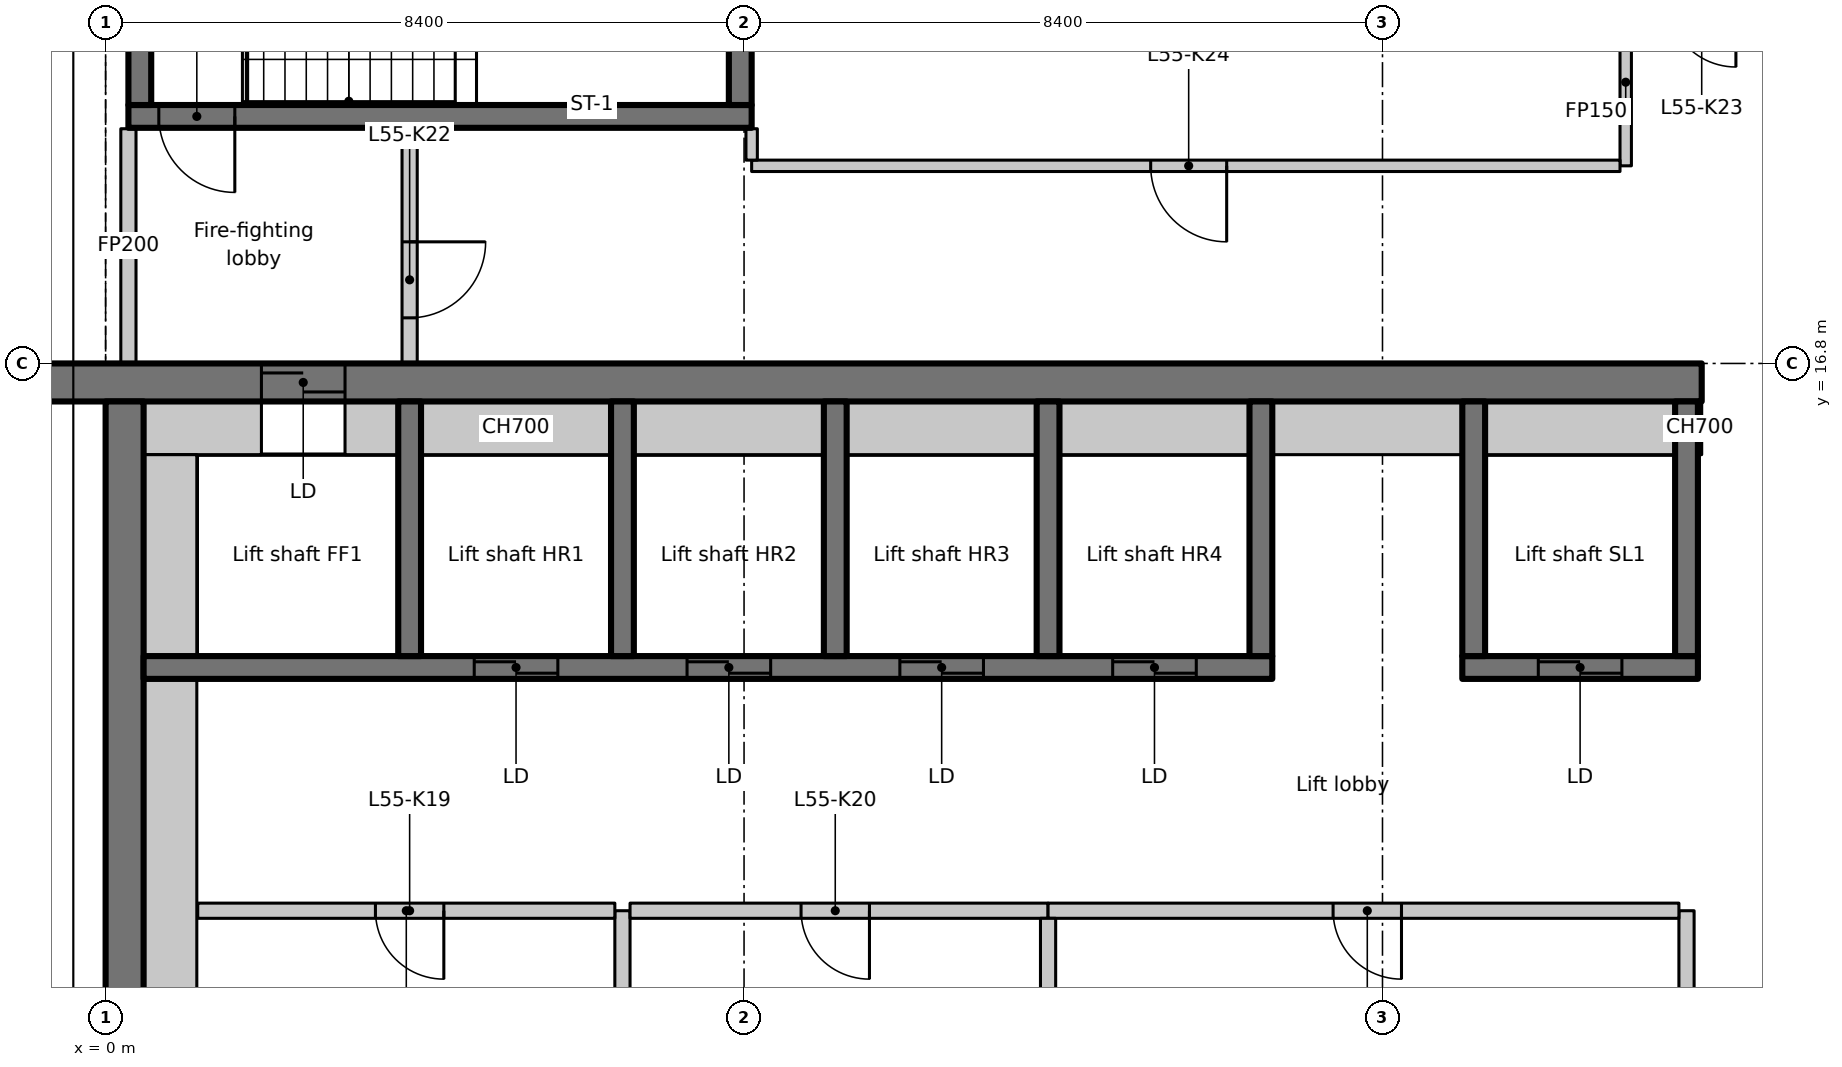
"""IFC4 building model, lengths in metres.
Left out: names, types, materials, properties, quantities, classifications, styles, units other than length and angle.
Written with IfcOpenShell. Run it as: python <this file> out.ifc"""

import sys

from ifc_helpers import new_model, si_unit, direction, frame, frame_2d, origin, place, context, subcontext, project, spatial, rectangle, extrude, element, fill, save


model = new_model("IFC4")
c1 = context("Model", 3, precision=1e-05, world=origin(), true_north=direction((0.0, 1.0)))
c2 = subcontext(c1, "Body", "Model", "MODEL_VIEW")
j1 = project(units=[si_unit("LENGTHUNIT", "METRE"), si_unit("PLANEANGLEUNIT", "RADIAN")], contexts=[c1])
p1 = place(None, origin())
s1 = spatial("IfcSite", under=j1, at=p1, CompositionType="ELEMENT")
p2 = place(p1, origin())
s2 = spatial("IfcBuilding", under=s1, at=p2, CompositionType="ELEMENT")
p3 = place(p2, frame((0.0, 0.0, 219.3)))
s3 = spatial("IfcBuildingStorey", under=s2, at=p3, CompositionType="ELEMENT", Elevation=219.3)
p4 = place(p3, frame((-1.1, 16.55, 0.0), z_axis=(0.0, 0.0, 1.0), x_axis=(1.0, 0.0, 0.0)))
e1 = element("IfcWall", 1, at=p4, inside=s3, PredefinedType="SHEAR", context=c2, shape_type="SweptSolid", body=[
    extrude(rectangle(XDim=22.1, YDim=0.5, at=frame_2d((11.05, 0.0))), origin(), (0.0, 0.0, 1.0), 3.35),
])
p5 = place(p4, frame((3.15, 0.0, 0.0)))
e2 = element("IfcOpeningElement", 2, at=p5, cuts=e1, PredefinedType="OPENING", context=c2, shape_type="SweptSolid", body=[
    extrude(rectangle(XDim=1.1, YDim=2.3, at=frame_2d((0.55, 1.15))), frame((0.0, 0.26, 0.0), z_axis=(0.0, -1.0, 0.0), x_axis=(1.0, 0.0, 0.0)), (0.0, 0.0, 1.0), 0.52),
])
p6 = place(p3, frame((0.25, 7.436, 0.0), z_axis=(0.0, 0.0, 1.0), x_axis=(0.0, 1.0, 0.0)))
e3 = element("IfcWall", 3, at=p6, inside=s3, PredefinedType="SHEAR", context=c2, shape_type="SweptSolid", body=[
    extrude(rectangle(XDim=8.864, YDim=0.5, at=frame_2d((4.432, 0.0))), origin(), (0.0, 0.0, 1.0), 3.35),
])
p7 = place(p3, frame((0.5, 15.95, 0.0), z_axis=(0.0, 0.0, 1.0), x_axis=(1.0, 0.0, 0.0)))
e4 = element("IfcWall", 4, at=p7, inside=s3, PredefinedType="PARTITIONING", context=c2, shape_type="SweptSolid", body=[
    extrude(rectangle(XDim=1.55, YDim=0.7, at=frame_2d((0.775, 0.0))), origin(), (0.0, 0.0, 1.0), 3.35),
])
p8 = place(p3, frame((0.5, 12.8, 0.0), z_axis=(0.0, 0.0, 1.0), x_axis=(1.0, 0.0, 0.0)))
e5 = element("IfcWall", 5, at=p8, inside=s3, PredefinedType="SHEAR", context=c2, shape_type="SweptSolid", body=[
    extrude(rectangle(XDim=14.85, YDim=0.3, at=frame_2d((7.425, 0.0))), origin(), (0.0, 0.0, 1.0), 3.35),
])
p9 = place(p8, frame((4.35, 0.0, 0.0)))
e6 = element("IfcOpeningElement", 6, at=p9, cuts=e5, PredefinedType="OPENING", context=c2, shape_type="SweptSolid", body=[
    extrude(rectangle(XDim=1.1, YDim=2.3, at=frame_2d((0.55, 1.15))), frame((0.0, 0.16, 0.0), z_axis=(0.0, -1.0, 0.0), x_axis=(1.0, 0.0, 0.0)), (0.0, 0.0, 1.0), 0.32),
])
p10 = place(p8, frame((7.15, 0.0, 0.0)))
e7 = element("IfcOpeningElement", 7, at=p10, cuts=e5, PredefinedType="OPENING", context=c2, shape_type="SweptSolid", body=[
    extrude(rectangle(XDim=1.1, YDim=2.3, at=frame_2d((0.55, 1.15))), frame((0.0, 0.16, 0.0), z_axis=(0.0, -1.0, 0.0), x_axis=(1.0, 0.0, 0.0)), (0.0, 0.0, 1.0), 0.32),
])
p11 = place(p8, frame((9.95, 0.0, 0.0)))
e8 = element("IfcOpeningElement", 8, at=p11, cuts=e5, PredefinedType="OPENING", context=c2, shape_type="SweptSolid", body=[
    extrude(rectangle(XDim=1.1, YDim=2.3, at=frame_2d((0.55, 1.15))), frame((0.0, 0.16, 0.0), z_axis=(0.0, -1.0, 0.0), x_axis=(1.0, 0.0, 0.0)), (0.0, 0.0, 1.0), 0.32),
])
p12 = place(p8, frame((12.75, 0.0, 0.0)))
e9 = element("IfcOpeningElement", 9, at=p12, cuts=e5, PredefinedType="OPENING", context=c2, shape_type="SweptSolid", body=[
    extrude(rectangle(XDim=1.1, YDim=2.3, at=frame_2d((0.55, 1.15))), frame((0.0, 0.16, 0.0), z_axis=(0.0, -1.0, 0.0), x_axis=(1.0, 0.0, 0.0)), (0.0, 0.0, 1.0), 0.32),
])
for number, where, z_axis, x_axis in (
    (10, (4.0, 12.95, 0.0), (0.0, 0.0, 1.0), (0.0, 1.0, 0.0)),
    (11, (6.8, 12.95, 0.0), (0.0, 0.0, 1.0), (0.0, 1.0, 0.0)),
    (12, (9.6, 12.95, 0.0), (0.0, 0.0, 1.0), (0.0, 1.0, 0.0)),
    (13, (12.4, 12.95, 0.0), (0.0, 0.0, 1.0), (0.0, 1.0, 0.0)),
    (14, (15.2, 12.95, 0.0), (0.0, 0.0, 1.0), (0.0, 1.0, 0.0)),
):
    element("IfcWall", number, at=place(p3, frame(where, z_axis=z_axis, x_axis=x_axis)), inside=s3, PredefinedType="SHEAR", context=c2, shape_type="SweptSolid", body=[
        extrude(rectangle(XDim=3.35, YDim=0.3, at=frame_2d((1.675, 0.0))), origin(), (0.0, 0.0, 1.0), 3.35),
    ])
p13 = place(p3, frame((17.85, 12.8, 0.0), z_axis=(0.0, 0.0, 1.0), x_axis=(1.0, 0.0, 0.0)))
e15 = element("IfcWall", 15, at=p13, inside=s3, PredefinedType="SHEAR", context=c2, shape_type="SweptSolid", body=[
    extrude(rectangle(XDim=3.1, YDim=0.3, at=frame_2d((1.55, 0.0))), origin(), (0.0, 0.0, 1.0), 3.35),
])
p14 = place(p13, frame((1.0, 0.0, 0.0)))
e16 = element("IfcOpeningElement", 16, at=p14, cuts=e15, PredefinedType="OPENING", context=c2, shape_type="SweptSolid", body=[
    extrude(rectangle(XDim=1.1, YDim=2.3, at=frame_2d((0.55, 1.15))), frame((0.0, 0.16, 0.0), z_axis=(0.0, -1.0, 0.0), x_axis=(1.0, 0.0, 0.0)), (0.0, 0.0, 1.0), 0.32),
])
for number, where, z_axis, x_axis in (
    (17, (18.0, 12.95, 0.0), (0.0, 0.0, 1.0), (0.0, 1.0, 0.0)),
    (18, (20.8, 12.95, 0.0), (0.0, 0.0, 1.0), (0.0, 1.0, 0.0)),
):
    element("IfcWall", number, at=place(p3, frame(where, z_axis=z_axis, x_axis=x_axis)), inside=s3, PredefinedType="SHEAR", context=c2, shape_type="SweptSolid", body=[
        extrude(rectangle(XDim=3.35, YDim=0.3, at=frame_2d((1.675, 0.0))), origin(), (0.0, 0.0, 1.0), 3.35),
    ])
p15 = place(p3, frame((8.5, 20.05, 0.0), z_axis=(0.0, 0.0, 1.0), x_axis=(-1.0, 0.0, 0.0)))
e19 = element("IfcWall", 19, at=p15, inside=s3, PredefinedType="SHEAR", context=c2, shape_type="SweptSolid", body=[
    extrude(rectangle(XDim=8.2, YDim=0.3, at=frame_2d((4.1, 0.0))), origin(), (0.0, 0.0, 1.0), 3.35),
])
p16 = place(p15, frame((6.8, 0.0, 0.0)))
e20 = element("IfcOpeningElement", 20, at=p16, cuts=e19, PredefinedType="OPENING", context=c2, shape_type="SweptSolid", body=[
    extrude(rectangle(XDim=1.0, YDim=2.1, at=frame_2d((0.5, 1.05))), frame((0.0, 0.16, 0.0), z_axis=(0.0, -1.0, 0.0), x_axis=(1.0, 0.0, 0.0)), (0.0, 0.0, 1.0), 0.32),
])
for number, where, z_axis, x_axis in (
    (21, (0.45, 20.2, 0.0), (0.0, 0.0, 1.0), (0.0, 1.0, 0.0)),
    (22, (8.35, 20.2, 0.0), (0.0, 0.0, 1.0), (0.0, 1.0, 0.0)),
):
    element("IfcWall", number, at=place(p3, frame(where, z_axis=z_axis, x_axis=x_axis)), inside=s3, PredefinedType="SHEAR", context=c2, shape_type="SweptSolid", body=[
        extrude(rectangle(XDim=2.55, YDim=0.3, at=frame_2d((1.275, 0.0))), origin(), (0.0, 0.0, 1.0), 3.35),
    ])
p17 = place(p3, frame((0.3, 16.812, 0.0), z_axis=(0.0, 0.0, 1.0), x_axis=(0.0, 1.0, 0.0)))
e23 = element("IfcWall", 23, at=p17, inside=s3, PredefinedType="PARTITIONING", context=c2, shape_type="SweptSolid", body=[
    extrude(rectangle(XDim=3.076, YDim=0.2, at=frame_2d((1.538, 0.0))), origin(), (0.0, 0.0, 1.0), 2.98),
])
p18 = place(p3, frame((4.0, 19.888, 0.0), z_axis=(0.0, 0.0, 1.0), x_axis=(0.0, -1.0, 0.0)))
e24 = element("IfcWall", 24, at=p18, inside=s3, PredefinedType="PARTITIONING", context=c2, shape_type="SweptSolid", body=[
    extrude(rectangle(XDim=3.076, YDim=0.2, at=frame_2d((1.538, 0.0))), origin(), (0.0, 0.0, 1.0), 3.35),
])
p19 = place(p18, frame((1.488, 0.0, 0.0)))
e25 = element("IfcOpeningElement", 25, at=p19, cuts=e24, PredefinedType="OPENING", context=c2, shape_type="SweptSolid", body=[
    extrude(rectangle(XDim=1.0, YDim=2.1, at=frame_2d((0.5, 1.05))), frame((0.0, 0.11, 0.0), z_axis=(0.0, -1.0, 0.0), x_axis=(1.0, 0.0, 0.0)), (0.0, 0.0, 1.0), 0.22),
])
p20 = place(p3, frame((6.8, 9.6, 0.0), z_axis=(0.0, 0.0, 1.0), x_axis=(0.0, -1.0, 0.0)))
e26 = element("IfcWall", 26, at=p20, inside=s3, PredefinedType="PARTITIONING", context=c2, shape_type="SweptSolid", body=[
    extrude(rectangle(XDim=2.5, YDim=0.2, at=frame_2d((1.25, 0.0))), origin(), (0.0, 0.0, 1.0), 3.35),
])
p21 = place(p3, frame((6.7, 9.6, 0.0), z_axis=(0.0, 0.0, 1.0), x_axis=(-1.0, 0.0, 0.0)))
e27 = element("IfcWall", 27, at=p21, inside=s3, PredefinedType="PARTITIONING", context=c2, shape_type="SweptSolid", body=[
    extrude(rectangle(XDim=5.488, YDim=0.2, at=frame_2d((2.744, 0.0))), origin(), (0.0, 0.0, 1.0), 3.35),
])
p22 = place(p21, frame((2.25, 0.0, 0.0)))
e28 = element("IfcOpeningElement", 28, at=p22, cuts=e27, PredefinedType="OPENING", context=c2, shape_type="SweptSolid", body=[
    extrude(rectangle(XDim=0.9, YDim=2.1, at=frame_2d((0.45, 1.05))), frame((0.0, 0.11, 0.0), z_axis=(0.0, -1.0, 0.0), x_axis=(1.0, 0.0, 0.0)), (0.0, 0.0, 1.0), 0.22),
])
p23 = place(p3, frame((12.4, 9.6, 0.0), z_axis=(0.0, 0.0, 1.0), x_axis=(-1.0, 0.0, 0.0)))
e29 = element("IfcWall", 29, at=p23, inside=s3, PredefinedType="PARTITIONING", context=c2, shape_type="SweptSolid", body=[
    extrude(rectangle(XDim=5.5, YDim=0.2, at=frame_2d((2.75, 0.0))), origin(), (0.0, 0.0, 1.0), 3.35),
])
p24 = place(p23, frame((2.35, 0.0, 0.0)))
e30 = element("IfcOpeningElement", 30, at=p24, cuts=e29, PredefinedType="OPENING", context=c2, shape_type="SweptSolid", body=[
    extrude(rectangle(XDim=0.9, YDim=2.1, at=frame_2d((0.45, 1.05))), frame((0.0, 0.11, 0.0), z_axis=(0.0, -1.0, 0.0), x_axis=(1.0, 0.0, 0.0)), (0.0, 0.0, 1.0), 0.22),
])
p25 = place(p3, frame((20.8, 7.1, 0.0), z_axis=(0.0, 0.0, 1.0), x_axis=(0.0, 1.0, 0.0)))
e31 = element("IfcWall", 31, at=p25, inside=s3, PredefinedType="PARTITIONING", context=c2, shape_type="SweptSolid", body=[
    extrude(rectangle(XDim=2.5, YDim=0.2, at=frame_2d((1.25, 0.0))), origin(), (0.0, 0.0, 1.0), 3.35),
])
p26 = place(p3, frame((20.7, 9.6, 0.0), z_axis=(0.0, 0.0, 1.0), x_axis=(-1.0, 0.0, 0.0)))
e32 = element("IfcWall", 32, at=p26, inside=s3, PredefinedType="PARTITIONING", context=c2, shape_type="SweptSolid", body=[
    extrude(rectangle(XDim=8.3, YDim=0.2, at=frame_2d((4.15, 0.0))), origin(), (0.0, 0.0, 1.0), 3.35),
])
p27 = place(p26, frame((3.65, 0.0, 0.0)))
e33 = element("IfcOpeningElement", 33, at=p27, cuts=e32, PredefinedType="OPENING", context=c2, shape_type="SweptSolid", body=[
    extrude(rectangle(XDim=0.9, YDim=2.1, at=frame_2d((0.45, 1.05))), frame((0.0, 0.11, 0.0), z_axis=(0.0, -1.0, 0.0), x_axis=(1.0, 0.0, 0.0)), (0.0, 0.0, 1.0), 0.22),
])
p28 = place(p3, frame((12.4, 9.5, 0.0), z_axis=(0.0, 0.0, 1.0), x_axis=(0.0, -1.0, 0.0)))
e34 = element("IfcWall", 34, at=p28, inside=s3, PredefinedType="PARTITIONING", context=c2, shape_type="SweptSolid", body=[
    extrude(rectangle(XDim=2.4, YDim=0.2, at=frame_2d((1.2, 0.0))), origin(), (0.0, 0.0, 1.0), 3.35),
])
p29 = place(p3, frame((20.0, 21.6, 0.0), z_axis=(0.0, 0.0, 1.0), x_axis=(0.0, -1.0, 0.0)))
e35 = element("IfcWall", 35, at=p29, inside=s3, PredefinedType="PARTITIONING", context=c2, shape_type="SweptSolid", body=[
    extrude(rectangle(XDim=2.2, YDim=0.15, at=frame_2d((1.1, 0.0))), origin(), (0.0, 0.0, 1.0), 3.35),
])
p30 = place(p3, frame((19.925, 19.4, 0.0), z_axis=(0.0, 0.0, 1.0), x_axis=(-1.0, 0.0, 0.0)))
e36 = element("IfcWall", 36, at=p30, inside=s3, PredefinedType="PARTITIONING", context=c2, shape_type="SweptSolid", body=[
    extrude(rectangle(XDim=11.425, YDim=0.15, at=frame_2d((5.712, 0.0))), origin(), (0.0, 0.0, 1.0), 3.35),
])
p31 = place(p30, frame((5.175, 0.0, 0.0)))
e37 = element("IfcOpeningElement", 37, at=p31, cuts=e36, PredefinedType="OPENING", context=c2, shape_type="SweptSolid", body=[
    extrude(rectangle(XDim=1.0, YDim=2.1, at=frame_2d((0.5, 1.05))), frame((0.0, 0.085, 0.0), z_axis=(0.0, -1.0, 0.0), x_axis=(1.0, 0.0, 0.0)), (0.0, 0.0, 1.0), 0.17),
])
p32 = place(p3, frame((8.5, 19.475, 0.0), z_axis=(0.0, 0.0, 1.0), x_axis=(0.0, 1.0, 0.0)))
e38 = element("IfcWall", 38, at=p32, inside=s3, PredefinedType="PARTITIONING", context=c2, shape_type="SweptSolid", body=[
    extrude(rectangle(XDim=0.413, YDim=0.15, at=frame_2d((0.207, 0.0))), origin(), (0.0, 0.0, 1.0), 3.35),
])
p33 = place(p3, frame((0.85, 7.436, 0.0), z_axis=(0.0, 0.0, 1.0), x_axis=(0.0, 1.0, 0.0)))
e39 = element("IfcWall", 39, at=p33, inside=s3, PredefinedType="PARTITIONING", context=c2, shape_type="SweptSolid", body=[
    extrude(rectangle(XDim=5.214, YDim=0.7, at=frame_2d((2.607, 0.0))), origin(), (0.0, 0.0, 1.0), 3.35),
])
p34 = place(p3, frame((0.85, 12.95, 0.0), z_axis=(0.0, 0.0, 1.0), x_axis=(0.0, 1.0, 0.0)))
e40 = element("IfcWall", 40, at=p34, inside=s3, PredefinedType="PARTITIONING", context=c2, shape_type="SweptSolid", body=[
    extrude(rectangle(XDim=2.65, YDim=0.7, at=frame_2d((1.325, 0.0))), origin(), (0.0, 0.0, 1.0), 3.35),
])
p35 = place(p3, frame((3.15, 15.95, 0.0), z_axis=(0.0, 0.0, 1.0), x_axis=(1.0, 0.0, 0.0)))
e41 = element("IfcWall", 41, at=p35, inside=s3, PredefinedType="PARTITIONING", context=c2, shape_type="SweptSolid", body=[
    extrude(rectangle(XDim=0.7, YDim=0.7, at=frame_2d((0.35, 0.0))), origin(), (0.0, 0.0, 1.0), 3.35),
])
for number, where, z_axis, x_axis in (
    (42, (4.15, 15.95, 0.0), (0.0, 0.0, 1.0), (1.0, 0.0, 0.0)),
    (43, (6.95, 15.95, 0.0), (0.0, 0.0, 1.0), (1.0, 0.0, 0.0)),
    (44, (9.75, 15.95, 0.0), (0.0, 0.0, 1.0), (1.0, 0.0, 0.0)),
    (45, (12.55, 15.95, 0.0), (0.0, 0.0, 1.0), (1.0, 0.0, 0.0)),
    (46, (15.35, 15.95, 0.0), (0.0, 0.0, 1.0), (1.0, 0.0, 0.0)),
    (47, (18.15, 15.95, 0.0), (0.0, 0.0, 1.0), (1.0, 0.0, 0.0)),
):
    element("IfcWall", number, at=place(p3, frame(where, z_axis=z_axis, x_axis=x_axis)), inside=s3, PredefinedType="PARTITIONING", context=c2, shape_type="SweptSolid", body=[
        extrude(rectangle(XDim=2.5, YDim=0.7, at=frame_2d((1.25, 0.0))), origin(), (0.0, 0.0, 1.0), 3.35),
    ])
p36 = place(p3, frame((20.95, 15.95, 0.0), z_axis=(0.0, 0.0, 1.0), x_axis=(1.0, 0.0, 0.0)))
e48 = element("IfcWall", 48, at=p36, inside=s3, PredefinedType="PARTITIONING", context=c2, shape_type="SweptSolid", body=[
    extrude(rectangle(XDim=0.05, YDim=0.7, at=frame_2d((0.025, 0.0))), origin(), (0.0, 0.0, 1.0), 3.35),
])
p37 = place(p5, origin())
e49 = element("IfcDoor", 49, at=p37, inside=s3, OperationType="SLIDING_TO_LEFT", PredefinedType="DOOR", context=c2, shape_type="SweptSolid", body=[
    extrude(rectangle(XDim=1.1, YDim=2.3, at=frame_2d((0.55, 1.15))), frame((0.0, 0.025, 0.0), z_axis=(0.0, -1.0, 0.0), x_axis=(1.0, 0.0, 0.0)), (0.0, 0.0, 1.0), 0.05),
])
fill(e2, e49)
p38 = place(p9, origin())
e50 = element("IfcDoor", 50, at=p38, inside=s3, OperationType="SLIDING_TO_LEFT", PredefinedType="DOOR", context=c2, shape_type="SweptSolid", body=[
    extrude(rectangle(XDim=1.1, YDim=2.3, at=frame_2d((0.55, 1.15))), frame((0.0, 0.025, 0.0), z_axis=(0.0, -1.0, 0.0), x_axis=(1.0, 0.0, 0.0)), (0.0, 0.0, 1.0), 0.05),
])
fill(e6, e50)
p39 = place(p10, origin())
e51 = element("IfcDoor", 51, at=p39, inside=s3, OperationType="SLIDING_TO_LEFT", PredefinedType="DOOR", context=c2, shape_type="SweptSolid", body=[
    extrude(rectangle(XDim=1.1, YDim=2.3, at=frame_2d((0.55, 1.15))), frame((0.0, 0.025, 0.0), z_axis=(0.0, -1.0, 0.0), x_axis=(1.0, 0.0, 0.0)), (0.0, 0.0, 1.0), 0.05),
])
fill(e7, e51)
p40 = place(p11, origin())
e52 = element("IfcDoor", 52, at=p40, inside=s3, OperationType="SLIDING_TO_LEFT", PredefinedType="DOOR", context=c2, shape_type="SweptSolid", body=[
    extrude(rectangle(XDim=1.1, YDim=2.3, at=frame_2d((0.55, 1.15))), frame((0.0, 0.025, 0.0), z_axis=(0.0, -1.0, 0.0), x_axis=(1.0, 0.0, 0.0)), (0.0, 0.0, 1.0), 0.05),
])
fill(e8, e52)
p41 = place(p12, origin())
e53 = element("IfcDoor", 53, at=p41, inside=s3, OperationType="SLIDING_TO_LEFT", PredefinedType="DOOR", context=c2, shape_type="SweptSolid", body=[
    extrude(rectangle(XDim=1.1, YDim=2.3, at=frame_2d((0.55, 1.15))), frame((0.0, 0.025, 0.0), z_axis=(0.0, -1.0, 0.0), x_axis=(1.0, 0.0, 0.0)), (0.0, 0.0, 1.0), 0.05),
])
fill(e9, e53)
p42 = place(p14, origin())
e54 = element("IfcDoor", 54, at=p42, inside=s3, OperationType="SLIDING_TO_LEFT", PredefinedType="DOOR", context=c2, shape_type="SweptSolid", body=[
    extrude(rectangle(XDim=1.1, YDim=2.3, at=frame_2d((0.55, 1.15))), frame((0.0, 0.025, 0.0), z_axis=(0.0, -1.0, 0.0), x_axis=(1.0, 0.0, 0.0)), (0.0, 0.0, 1.0), 0.05),
])
fill(e16, e54)
p43 = place(p16, origin())
e55 = element("IfcDoor", 55, at=p43, inside=s3, OperationType="SINGLE_SWING_RIGHT", PredefinedType="DOOR", context=c2, shape_type="SweptSolid", body=[
    extrude(rectangle(XDim=1.0, YDim=2.1, at=frame_2d((0.5, 1.05))), frame((0.0, 0.025, 0.0), z_axis=(0.0, -1.0, 0.0), x_axis=(1.0, 0.0, 0.0)), (0.0, 0.0, 1.0), 0.05),
])
fill(e20, e55)
p44 = place(p22, origin())
e56 = element("IfcDoor", 56, at=p44, inside=s3, OperationType="SINGLE_SWING_LEFT", PredefinedType="DOOR", context=c2, shape_type="SweptSolid", body=[
    extrude(rectangle(XDim=0.9, YDim=2.1, at=frame_2d((0.45, 1.05))), frame((0.0, 0.025, 0.0), z_axis=(0.0, -1.0, 0.0), x_axis=(1.0, 0.0, 0.0)), (0.0, 0.0, 1.0), 0.05),
])
fill(e28, e56)
p45 = place(p24, origin())
e57 = element("IfcDoor", 57, at=p45, inside=s3, OperationType="SINGLE_SWING_RIGHT", PredefinedType="DOOR", context=c2, shape_type="SweptSolid", body=[
    extrude(rectangle(XDim=0.9, YDim=2.1, at=frame_2d((0.45, 1.05))), frame((0.0, 0.025, 0.0), z_axis=(0.0, -1.0, 0.0), x_axis=(1.0, 0.0, 0.0)), (0.0, 0.0, 1.0), 0.05),
])
fill(e30, e57)
p46 = place(p27, origin())
e58 = element("IfcDoor", 58, at=p46, inside=s3, OperationType="SINGLE_SWING_LEFT", PredefinedType="DOOR", context=c2, shape_type="SweptSolid", body=[
    extrude(rectangle(XDim=0.9, YDim=2.1, at=frame_2d((0.45, 1.05))), frame((0.0, 0.025, 0.0), z_axis=(0.0, -1.0, 0.0), x_axis=(1.0, 0.0, 0.0)), (0.0, 0.0, 1.0), 0.05),
])
fill(e33, e58)
p47 = place(p19, origin())
e59 = element("IfcDoor", 59, at=p47, inside=s3, OperationType="SINGLE_SWING_RIGHT", PredefinedType="DOOR", context=c2, shape_type="SweptSolid", body=[
    extrude(rectangle(XDim=1.0, YDim=2.1, at=frame_2d((0.5, 1.05))), frame((0.0, 0.025, 0.0), z_axis=(0.0, -1.0, 0.0), x_axis=(1.0, 0.0, 0.0)), (0.0, 0.0, 1.0), 0.05),
])
fill(e25, e59)
p48 = place(p31, origin())
e60 = element("IfcDoor", 60, at=p48, inside=s3, OperationType="SINGLE_SWING_RIGHT", PredefinedType="DOOR", context=c2, shape_type="SweptSolid", body=[
    extrude(rectangle(XDim=1.0, YDim=2.1, at=frame_2d((0.5, 1.05))), frame((0.0, 0.025, 0.0), z_axis=(0.0, -1.0, 0.0), x_axis=(1.0, 0.0, 0.0)), (0.0, 0.0, 1.0), 0.05),
])
fill(e37, e60)
save(model, sys.argv[1])
